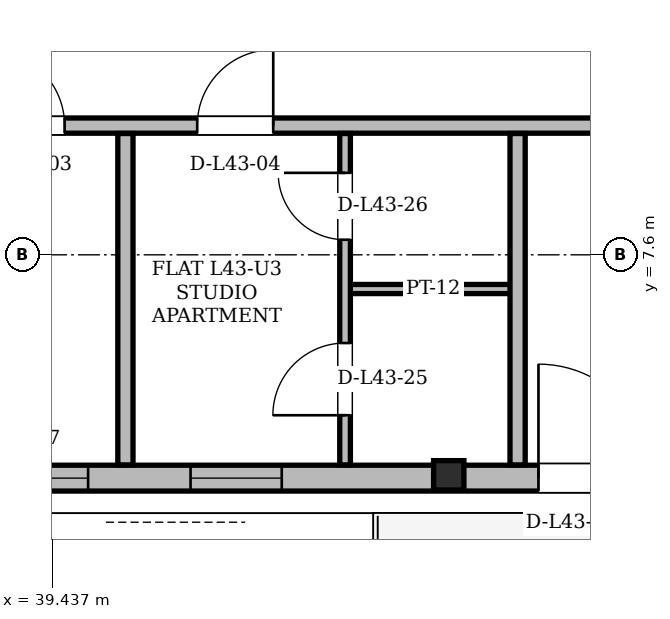
"""IFC4 building model, lengths in metres.
Left out: names, types, materials, properties, quantities, classifications, styles, units other than length and angle.
Written with IfcOpenShell. Run it as: python <this file> out.ifc"""

import sys

from ifc_helpers import new_model, si_unit, direction, frame, frame_2d, origin, origin_2d, place, context, subcontext, project, spatial, rectangle, i_section, extrude, element, fill, save


model = new_model("IFC4")
c1 = context("Model", 3, precision=1e-05, world=origin(), true_north=direction((0.0, 1.0)))
c2 = subcontext(c1, "Body", "Model", "MODEL_VIEW")
j1 = project(units=[si_unit("LENGTHUNIT", "METRE"), si_unit("PLANEANGLEUNIT", "RADIAN")], contexts=[c1])
p1 = place(None, origin())
s1 = spatial("IfcSite", under=j1, at=p1, CompositionType="ELEMENT")
p2 = place(p1, origin())
s2 = spatial("IfcBuilding", under=s1, at=p2, CompositionType="ELEMENT")
p3 = place(p2, frame((0.0, 0.0, 163.8)))
s3 = spatial("IfcBuildingStorey", under=s2, at=p3, CompositionType="ELEMENT", Elevation=163.8)
p4 = place(p3, frame((44.648, 4.662, 0.004), z_axis=(0.003534468677, 0.020731018202, 0.999778841752), x_axis=(-0.985775631718, 0.16806666508, 0.0)))
e1 = element("IfcColumn", 1, at=p4, inside=s3, PredefinedType="COLUMN", context=c2, shape_type="SweptSolid", body=[
    extrude(i_section(OverallWidth=0.399, OverallDepth=0.386, WebThickness=0.021, FlangeThickness=0.033, at=origin_2d()), origin(), (0.0, 0.0, 1.0), 3.592),
])
p5 = place(p3, frame((19.631, 4.662, 0.0), z_axis=(0.0, 0.0, 1.0), x_axis=(1.0, 0.0, 0.0)))
e2 = element("IfcWall", 2, at=p5, inside=s3, PredefinedType="SOLIDWALL", context=c2, shape_type="SweptSolid", body=[
    extrude(rectangle(XDim=35.738, YDim=0.34, at=frame_2d((17.869, 0.0))), origin(), (0.0, 0.0, 1.0), 2.6),
])
p6 = place(p5, frame((6.579, 0.0, 0.0)))
e3 = element("IfcOpeningElement", 3, at=p6, cuts=e2, PredefinedType="OPENING", context=c2, shape_type="SweptSolid", body=[
    extrude(rectangle(XDim=1.5, YDim=2.2, at=frame_2d((0.75, 1.1))), frame((0.0, 0.17, 0.0), z_axis=(0.0, -1.0, 0.0), x_axis=(1.0, 0.0, 0.0)), (0.0, 0.0, 1.0), 0.34),
])
p7 = place(p5, frame((26.204, 0.0, 0.0)))
e4 = element("IfcOpeningElement", 4, at=p7, cuts=e2, PredefinedType="OPENING", context=c2, shape_type="SweptSolid", body=[
    extrude(rectangle(XDim=1.5, YDim=2.2, at=frame_2d((0.75, 1.1))), frame((0.0, 0.17, 0.0), z_axis=(0.0, -1.0, 0.0), x_axis=(1.0, 0.0, 0.0)), (0.0, 0.0, 1.0), 0.34),
])
p8 = place(p5, frame((1.818, 0.0, 0.85)))
e5 = element("IfcOpeningElement", 5, at=p8, cuts=e2, PredefinedType="OPENING", context=c2, shape_type="SweptSolid", body=[
    extrude(rectangle(XDim=2.6, YDim=1.64, at=frame_2d((1.3, 0.82))), frame((0.0, 0.17, 0.0), z_axis=(0.0, -1.0, 0.0), x_axis=(1.0, 0.0, 0.0)), (0.0, 0.0, 1.0), 0.34),
])
p9 = place(p5, frame((18.678, 0.0, 0.85)))
e6 = element("IfcOpeningElement", 6, at=p9, cuts=e2, PredefinedType="OPENING", context=c2, shape_type="SweptSolid", body=[
    extrude(rectangle(XDim=1.6, YDim=1.64, at=frame_2d((0.8, 0.82))), frame((0.0, 0.17, 0.0), z_axis=(0.0, -1.0, 0.0), x_axis=(1.0, 0.0, 0.0)), (0.0, 0.0, 1.0), 0.34),
])
p10 = place(p5, frame((31.91, 0.0, 0.85)))
e7 = element("IfcOpeningElement", 7, at=p10, cuts=e2, PredefinedType="OPENING", context=c2, shape_type="SweptSolid", body=[
    extrude(rectangle(XDim=1.6, YDim=1.64, at=frame_2d((0.8, 0.82))), frame((0.0, 0.17, 0.0), z_axis=(0.0, -1.0, 0.0), x_axis=(1.0, 0.0, 0.0)), (0.0, 0.0, 1.0), 0.34),
])
p11 = place(p5, frame((21.626, 0.0, 0.85)))
e8 = element("IfcOpeningElement", 8, at=p11, cuts=e2, PredefinedType="OPENING", context=c2, shape_type="SweptSolid", body=[
    extrude(rectangle(XDim=1.2, YDim=1.48, at=frame_2d((0.6, 0.74))), frame((0.0, 0.17, 0.0), z_axis=(0.0, -1.0, 0.0), x_axis=(1.0, 0.0, 0.0)), (0.0, 0.0, 1.0), 0.34),
])
p12 = place(p3, frame((43.29, 7.15, 0.0), z_axis=(0.0, 0.0, 1.0), x_axis=(1.0, 0.0, 0.0)))
e9 = element("IfcWall", 9, at=p12, inside=s3, PredefinedType="PARTITIONING", context=c2, shape_type="SweptSolid", body=[
    extrude(rectangle(XDim=2.321, YDim=0.12, at=frame_2d((1.16, 0.0))), origin(), (0.0, 0.0, 1.0), 3.38),
])
p13 = place(p3, frame((19.6, 9.3, 0.0), z_axis=(0.0, 0.0, 1.0), x_axis=(1.0, 0.0, 0.0)))
e10 = element("IfcWall", 10, at=p13, inside=s3, PredefinedType="PARTITIONING", context=c2, shape_type="SweptSolid", body=[
    extrude(rectangle(XDim=30.4, YDim=0.2, at=frame_2d((15.2, 0.0))), origin(), (0.0, 0.0, 1.0), 2.842),
])
p14 = place(p13, frame((4.349, 0.0, 0.0)))
e11 = element("IfcOpeningElement", 11, at=p14, cuts=e10, PredefinedType="OPENING", context=c2, shape_type="SweptSolid", body=[
    extrude(rectangle(XDim=1.0, YDim=2.18, at=frame_2d((0.5, 1.09))), frame((0.0, 0.1, 0.0), z_axis=(0.0, -1.0, 0.0), x_axis=(1.0, 0.0, 0.0)), (0.0, 0.0, 1.0), 0.2),
])
p15 = place(p13, frame((15.05, 0.0, 0.0)))
e12 = element("IfcOpeningElement", 12, at=p15, cuts=e10, PredefinedType="OPENING", context=c2, shape_type="SweptSolid", body=[
    extrude(rectangle(XDim=1.3, YDim=2.2, at=frame_2d((0.65, 1.1))), frame((0.0, 0.1, 0.0), z_axis=(0.0, -1.0, 0.0), x_axis=(1.0, 0.0, 0.0)), (0.0, 0.0, 1.0), 0.2),
])
p16 = place(p13, frame((19.0, 0.0, 0.0)))
e13 = element("IfcOpeningElement", 13, at=p16, cuts=e10, PredefinedType="OPENING", context=c2, shape_type="SweptSolid", body=[
    extrude(rectangle(XDim=1.0, YDim=2.18, at=frame_2d((0.5, 1.09))), frame((0.0, 0.1, 0.0), z_axis=(0.0, -1.0, 0.0), x_axis=(1.0, 0.0, 0.0)), (0.0, 0.0, 1.0), 0.2),
])
p17 = place(p13, frame((21.745, 0.0, 0.0)))
e14 = element("IfcOpeningElement", 14, at=p17, cuts=e10, PredefinedType="OPENING", context=c2, shape_type="SweptSolid", body=[
    extrude(rectangle(XDim=1.0, YDim=2.18, at=frame_2d((0.5, 1.09))), frame((0.0, 0.1, 0.0), z_axis=(0.0, -1.0, 0.0), x_axis=(1.0, 0.0, 0.0)), (0.0, 0.0, 1.0), 0.2),
])
p18 = place(p13, frame((28.532, 0.0, 0.0)))
e15 = element("IfcOpeningElement", 15, at=p18, cuts=e10, PredefinedType="OPENING", context=c2, shape_type="SweptSolid", body=[
    extrude(rectangle(XDim=1.0, YDim=2.18, at=frame_2d((0.5, 1.09))), frame((0.0, 0.1, 0.0), z_axis=(0.0, -1.0, 0.0), x_axis=(1.0, 0.0, 0.0)), (0.0, 0.0, 1.0), 0.2),
])
p19 = place(p3, frame((40.4, 4.836, 0.0), z_axis=(0.0, 0.0, 1.0), x_axis=(0.0, 1.0, 0.0)))
e16 = element("IfcWall", 16, at=p19, inside=s3, PredefinedType="PARTITIONING", context=c2, shape_type="SweptSolid", body=[
    extrude(rectangle(XDim=4.36, YDim=0.2, at=frame_2d((2.18, 0.0))), origin(), (0.0, 0.0, 1.0), 3.38),
])
p20 = place(p3, frame((43.29, 4.836, 0.0), z_axis=(0.0, 0.0, 1.0), x_axis=(0.0, 1.0, 0.0)))
e17 = element("IfcWall", 17, at=p20, inside=s3, PredefinedType="PARTITIONING", context=c2, shape_type="SweptSolid", body=[
    extrude(rectangle(XDim=4.36, YDim=0.14, at=frame_2d((2.18, 0.0))), origin(), (0.0, 0.0, 1.0), 2.966),
])
p21 = place(p20, frame((0.654, 0.0, 0.0)))
e18 = element("IfcOpeningElement", 18, at=p21, cuts=e17, PredefinedType="OPENING", context=c2, shape_type="SweptSolid", body=[
    extrude(rectangle(XDim=0.95, YDim=2.1, at=frame_2d((0.475, 1.05))), frame((0.0, 0.07, 0.0), z_axis=(0.0, -1.0, 0.0), x_axis=(1.0, 0.0, 0.0)), (0.0, 0.0, 1.0), 0.14),
])
p22 = place(p20, frame((2.962, 0.0, 0.0)))
e19 = element("IfcOpeningElement", 19, at=p22, cuts=e17, PredefinedType="OPENING", context=c2, shape_type="SweptSolid", body=[
    extrude(rectangle(XDim=0.88, YDim=2.08, at=frame_2d((0.44, 1.04))), frame((0.0, 0.07, 0.0), z_axis=(0.0, -1.0, 0.0), x_axis=(1.0, 0.0, 0.0)), (0.0, 0.0, 1.0), 0.14),
])
p23 = place(p3, frame((45.56, 4.836, 0.0), z_axis=(0.0, 0.0, 1.0), x_axis=(0.0, 1.0, 0.0)))
e20 = element("IfcWall", 20, at=p23, inside=s3, PredefinedType="PARTITIONING", context=c2, shape_type="SweptSolid", body=[
    extrude(rectangle(XDim=4.36, YDim=0.2, at=frame_2d((2.18, 0.0))), origin(), (0.0, 0.0, 1.0), 2.966),
])
p24 = place(p7, origin())
e21 = element("IfcDoor", 21, at=p24, inside=s3, OperationType="SINGLE_SWING_LEFT", PredefinedType="DOOR", context=c2, shape_type="SweptSolid", body=[
    extrude(rectangle(XDim=1.5, YDim=2.2, at=frame_2d((0.75, 1.1))), frame((0.0, 0.025, 0.0), z_axis=(0.0, -1.0, 0.0), x_axis=(1.0, 0.0, 0.0)), (0.0, 0.0, 1.0), 0.05),
])
fill(e4, e21)
p25 = place(p9, origin())
e22 = element("IfcWindow", 22, at=p25, inside=s3, PartitioningType="SINGLE_PANEL", PredefinedType="WINDOW", context=c2, shape_type="SweptSolid", body=[
    extrude(rectangle(XDim=1.6, YDim=1.64, at=frame_2d((0.8, 0.82))), frame((0.0, 0.03, 0.0), z_axis=(0.0, -1.0, 0.0), x_axis=(1.0, 0.0, 0.0)), (0.0, 0.0, 1.0), 0.06),
])
fill(e6, e22)
p26 = place(p11, origin())
e23 = element("IfcWindow", 23, at=p26, inside=s3, PartitioningType="SINGLE_PANEL", PredefinedType="WINDOW", context=c2, shape_type="SweptSolid", body=[
    extrude(rectangle(XDim=1.2, YDim=1.48, at=frame_2d((0.6, 0.74))), frame((0.0, 0.03, 0.0), z_axis=(0.0, -1.0, 0.0), x_axis=(1.0, 0.0, 0.0)), (0.0, 0.0, 1.0), 0.06),
])
fill(e8, e23)
p27 = place(p16, origin())
e24 = element("IfcDoor", 24, at=p27, inside=s3, OperationType="SINGLE_SWING_LEFT", PredefinedType="DOOR", context=c2, shape_type="SweptSolid", body=[
    extrude(rectangle(XDim=1.0, YDim=2.18, at=frame_2d((0.5, 1.09))), frame((0.0, 0.025, 0.0), z_axis=(0.0, -1.0, 0.0), x_axis=(1.0, 0.0, 0.0)), (0.0, 0.0, 1.0), 0.05),
])
fill(e13, e24)
p28 = place(p17, origin())
e25 = element("IfcDoor", 25, at=p28, inside=s3, OperationType="SINGLE_SWING_RIGHT", PredefinedType="DOOR", context=c2, shape_type="SweptSolid", body=[
    extrude(rectangle(XDim=1.0, YDim=2.18, at=frame_2d((0.5, 1.09))), frame((0.0, 0.025, 0.0), z_axis=(0.0, -1.0, 0.0), x_axis=(1.0, 0.0, 0.0)), (0.0, 0.0, 1.0), 0.05),
])
fill(e14, e25)
p29 = place(p21, origin())
e26 = element("IfcDoor", 26, at=p29, inside=s3, OperationType="SINGLE_SWING_LEFT", PredefinedType="DOOR", context=c2, shape_type="SweptSolid", body=[
    extrude(rectangle(XDim=0.95, YDim=2.1, at=frame_2d((0.475, 1.05))), frame((0.0, 0.025, 0.0), z_axis=(0.0, -1.0, 0.0), x_axis=(1.0, 0.0, 0.0)), (0.0, 0.0, 1.0), 0.05),
])
fill(e18, e26)
p30 = place(p22, origin())
e27 = element("IfcDoor", 27, at=p30, inside=s3, OperationType="SINGLE_SWING_RIGHT", PredefinedType="DOOR", context=c2, shape_type="SweptSolid", body=[
    extrude(rectangle(XDim=0.88, YDim=2.08, at=frame_2d((0.44, 1.04))), frame((0.0, 0.025, 0.0), z_axis=(0.0, -1.0, 0.0), x_axis=(1.0, 0.0, 0.0)), (0.0, 0.0, 1.0), 0.05),
])
fill(e19, e27)
save(model, sys.argv[1])
